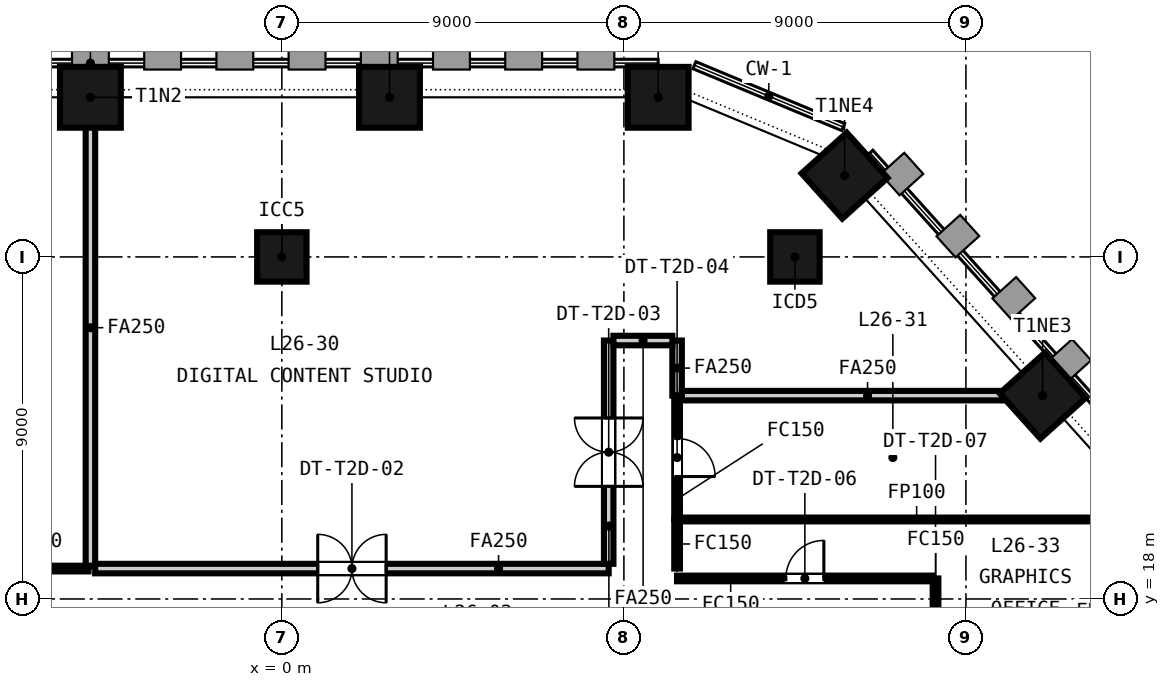
"""IFC4 building model, lengths in metres.
Left out: names, types, materials, properties, quantities, classifications, styles, units other than length and angle.
Written with IfcOpenShell. Run it as: python <this file> out.ifc"""

import sys

from ifc_helpers import new_model, si_unit, direction, frame, frame_2d, origin, origin_2d, place, context, subcontext, project, spatial, rectangle, extrude, element, fill, save


model = new_model("IFC4")
c1 = context("Model", 3, precision=1e-05, world=origin(), true_north=direction((0.0, 1.0)))
c2 = subcontext(c1, "Body", "Model", "MODEL_VIEW")
j1 = project(units=[si_unit("LENGTHUNIT", "METRE"), si_unit("PLANEANGLEUNIT", "RADIAN")], contexts=[c1])
p1 = place(None, origin())
s1 = spatial("IfcSite", under=j1, at=p1, CompositionType="ELEMENT")
p2 = place(p1, origin())
s2 = spatial("IfcBuilding", under=s1, at=p2, CompositionType="ELEMENT")
p3 = place(p2, frame((0.0, 0.0, 109.85)))
s3 = spatial("IfcBuildingStorey", under=s2, at=p3, CompositionType="ELEMENT", Elevation=109.85)
for number, where, z_axis, x_axis in (
    (1, (9.902, 31.2, -0.15), (0.0, 0.0, 1.0), (-1.0, 0.0, 0.0)),
    (2, (2.832, 31.2, -0.15), (0.0, 0.0, 1.0), (-1.0, 0.0, 0.0)),
    (3, (-5.037, 31.2, -0.15), (0.0, 0.0, 1.0), (-1.0, 0.0, 0.0)),
    (4, (20.018, 23.35, -0.15), (0.0, 0.0, 1.0), (-0.669, 0.743, 0.0)),
    (5, (14.806, 29.139, -0.15), (0.0, 0.0, 1.0), (-0.669, 0.743, 0.0)),
):
    element("IfcColumn", number, at=place(p3, frame(where, z_axis=z_axis, x_axis=x_axis)), inside=s3, PredefinedType="COLUMN", context=c2, shape_type="SweptSolid", body=[
        extrude(rectangle(XDim=1.6, YDim=1.6, at=origin_2d()), origin(), (0.0, 0.0, 1.0), 3.65),
    ])
for number, where, z_axis, x_axis in (
    (6, (0.0, 27.0, -0.15), (0.0, 0.0, 1.0), (1.0, 0.0, 0.0)),
    (7, (13.5, 27.0, -0.15), (0.0, 0.0, 1.0), (1.0, 0.0, 0.0)),
):
    element("IfcColumn", number, at=place(p3, frame(where, z_axis=z_axis, x_axis=x_axis)), inside=s3, PredefinedType="COLUMN", context=c2, shape_type="SweptSolid", body=[
        extrude(rectangle(XDim=1.3, YDim=1.3, at=origin_2d()), origin(), (0.0, 0.0, 1.0), 3.65),
    ])
p4 = place(p3, frame((10.4, 24.8, 0.0), z_axis=(0.0, 0.0, 1.0), x_axis=(0.0, -1.0, 0.0)))
e8 = element("IfcWall", 8, at=p4, inside=s3, PredefinedType="PARTITIONING", context=c2, shape_type="SweptSolid", body=[
    extrude(rectangle(XDim=1.45, YDim=0.25, at=frame_2d((0.725, 0.0))), origin(), (0.0, 0.0, 1.0), 2.741),
])
p5 = place(p3, frame((10.4, 23.35, 0.0), z_axis=(0.0, 0.0, 1.0), x_axis=(0.0, -1.0, 0.0)))
e9 = element("IfcWall", 9, at=p5, inside=s3, PredefinedType="PARTITIONING", context=c2, shape_type="SweptSolid", body=[
    extrude(rectangle(XDim=3.258, YDim=0.15, at=frame_2d((1.629, 0.0))), origin(), (0.0, 0.0, 1.0), 2.741),
])
p6 = place(p5, frame((1.129, 0.0, 0.0)))
e10 = element("IfcOpeningElement", 10, at=p6, cuts=e9, PredefinedType="OPENING", context=c2, shape_type="SweptSolid", body=[
    extrude(rectangle(XDim=1.0, YDim=2.1, at=frame_2d((0.5, 1.05))), frame((0.0, 0.085, 0.0), z_axis=(0.0, -1.0, 0.0), x_axis=(1.0, 0.0, 0.0)), (0.0, 0.0, 1.0), 0.17),
])
p7 = place(p3, frame((10.4, 20.092, 0.0), z_axis=(0.0, 0.0, 1.0), x_axis=(0.0, -1.0, 0.0)))
e11 = element("IfcWall", 11, at=p7, inside=s3, PredefinedType="PARTITIONING", context=c2, shape_type="SweptSolid", body=[
    extrude(rectangle(XDim=1.29, YDim=0.15, at=frame_2d((0.645, 0.0))), origin(), (0.0, 0.0, 1.0), 2.741),
])
p8 = place(p3, frame((17.2, 18.54, 0.0), z_axis=(0.0, 0.0, 1.0), x_axis=(0.0, -1.0, 0.0)))
e12 = element("IfcWall", 12, at=p8, inside=s3, PredefinedType="PARTITIONING", context=c2, shape_type="SweptSolid", body=[
    extrude(rectangle(XDim=1.573, YDim=0.15, at=frame_2d((0.787, 0.0))), origin(), (0.0, 0.0, 1.0), 2.741),
])
p9 = place(p3, frame((-8.025, 18.8, 0.0), z_axis=(0.0, 0.0, 1.0), x_axis=(1.0, 0.0, 0.0)))
e13 = element("IfcWall", 13, at=p9, inside=s3, PredefinedType="PARTITIONING", context=c2, shape_type="SweptSolid", body=[
    extrude(rectangle(XDim=2.938, YDim=0.15, at=frame_2d((1.469, 0.0))), origin(), (0.0, 0.0, 1.0), 2.741),
])
p10 = place(p3, frame((-5.037, 18.875, 0.0), z_axis=(0.0, 0.0, 1.0), x_axis=(0.0, 1.0, 0.0)))
e14 = element("IfcWall", 14, at=p10, inside=s3, PredefinedType="PARTITIONING", context=c2, shape_type="SweptSolid", body=[
    extrude(rectangle(XDim=12.525, YDim=0.25, at=frame_2d((6.262, 0.0))), origin(), (0.0, 0.0, 1.0), 2.741),
])
p11 = place(p3, frame((-4.912, 18.8, 0.0), z_axis=(0.0, 0.0, 1.0), x_axis=(1.0, 0.0, 0.0)))
e15 = element("IfcWall", 15, at=p11, inside=s3, PredefinedType="PARTITIONING", context=c2, shape_type="SweptSolid", body=[
    extrude(rectangle(XDim=13.512, YDim=0.25, at=frame_2d((6.756, 0.0))), origin(), (0.0, 0.0, 1.0), 2.741),
])
p12 = place(p11, frame((5.856, 0.0, 0.0)))
e16 = element("IfcOpeningElement", 16, at=p12, cuts=e15, PredefinedType="OPENING", context=c2, shape_type="SweptSolid", body=[
    extrude(rectangle(XDim=1.8, YDim=2.1, at=frame_2d((0.9, 1.05))), frame((0.0, 0.135, 0.0), z_axis=(0.0, -1.0, 0.0), x_axis=(1.0, 0.0, 0.0)), (0.0, 0.0, 1.0), 0.27),
])
p13 = place(p3, frame((8.6, 18.925, 0.0), z_axis=(0.0, 0.0, 1.0), x_axis=(0.0, 1.0, 0.0)))
e17 = element("IfcWall", 17, at=p13, inside=s3, PredefinedType="PARTITIONING", context=c2, shape_type="SweptSolid", body=[
    extrude(rectangle(XDim=5.875, YDim=0.25, at=frame_2d((2.938, 0.0))), origin(), (0.0, 0.0, 1.0), 2.741),
])
p14 = place(p13, frame((2.038, 0.0, 0.0)))
e18 = element("IfcOpeningElement", 18, at=p14, cuts=e17, PredefinedType="OPENING", context=c2, shape_type="SweptSolid", body=[
    extrude(rectangle(XDim=1.8, YDim=2.1, at=frame_2d((0.9, 1.05))), frame((0.0, 0.135, 0.0), z_axis=(0.0, -1.0, 0.0), x_axis=(1.0, 0.0, 0.0)), (0.0, 0.0, 1.0), 0.27),
])
p15 = place(p3, frame((8.725, 24.8, 0.0), z_axis=(0.0, 0.0, 1.0), x_axis=(1.0, 0.0, 0.0)))
e19 = element("IfcWall", 19, at=p15, inside=s3, PredefinedType="PARTITIONING", context=c2, shape_type="SweptSolid", body=[
    extrude(rectangle(XDim=1.55, YDim=0.25, at=frame_2d((0.775, 0.0))), origin(), (0.0, 0.0, 1.0), 2.741),
])
p16 = place(p3, frame((10.525, 23.35, 0.0), z_axis=(0.0, 0.0, 1.0), x_axis=(1.0, 0.0, 0.0)))
e20 = element("IfcWall", 20, at=p16, inside=s3, PredefinedType="PARTITIONING", context=c2, shape_type="SweptSolid", body=[
    extrude(rectangle(XDim=9.762, YDim=0.25, at=frame_2d((4.881, 0.0))), origin(), (0.0, 0.0, 1.0), 2.741),
])
p17 = place(p3, frame((10.475, 20.092, 0.0), z_axis=(0.0, 0.0, 1.0), x_axis=(1.0, 0.0, 0.0)))
e21 = element("IfcWall", 21, at=p17, inside=s3, PredefinedType="PARTITIONING", context=c2, shape_type="SweptSolid", body=[
    extrude(rectangle(XDim=12.446, YDim=0.1, at=frame_2d((6.223, 0.0))), origin(), (0.0, 0.0, 1.0), 2.741),
])
p18 = place(p3, frame((10.398, 18.54, 0.0), z_axis=(0.0, 0.0, 1.0), x_axis=(1.0, 0.0, 0.0)))
e22 = element("IfcWall", 22, at=p18, inside=s3, PredefinedType="PARTITIONING", context=c2, shape_type="SweptSolid", body=[
    extrude(rectangle(XDim=6.727, YDim=0.15, at=frame_2d((3.364, 0.0))), origin(), (0.0, 0.0, 1.0), 2.741),
])
p19 = place(p18, frame((2.864, 0.0, 0.0)))
e23 = element("IfcOpeningElement", 23, at=p19, cuts=e22, PredefinedType="OPENING", context=c2, shape_type="SweptSolid", body=[
    extrude(rectangle(XDim=1.0, YDim=2.1, at=frame_2d((0.5, 1.05))), frame((0.0, 0.085, 0.0), z_axis=(0.0, -1.0, 0.0), x_axis=(1.0, 0.0, 0.0)), (0.0, 0.0, 1.0), 0.17),
])
p20 = place(p12, origin())
e24 = element("IfcDoor", 24, at=p20, inside=s3, OperationType="DOUBLE_DOOR_DOUBLE_SWING", PredefinedType="DOOR", context=c2, shape_type="SweptSolid", body=[
    extrude(rectangle(XDim=1.8, YDim=2.1, at=frame_2d((0.9, 1.05))), frame((0.0, 0.025, 0.0), z_axis=(0.0, -1.0, 0.0), x_axis=(1.0, 0.0, 0.0)), (0.0, 0.0, 1.0), 0.05),
])
fill(e16, e24)
p21 = place(p14, origin())
e25 = element("IfcDoor", 25, at=p21, inside=s3, OperationType="DOUBLE_DOOR_DOUBLE_SWING", PredefinedType="DOOR", context=c2, shape_type="SweptSolid", body=[
    extrude(rectangle(XDim=1.8, YDim=2.1, at=frame_2d((0.9, 1.05))), frame((0.0, 0.025, 0.0), z_axis=(0.0, -1.0, 0.0), x_axis=(1.0, 0.0, 0.0)), (0.0, 0.0, 1.0), 0.05),
])
fill(e18, e25)
p22 = place(p6, origin())
e26 = element("IfcDoor", 26, at=p22, inside=s3, OperationType="SINGLE_SWING_RIGHT", PredefinedType="DOOR", context=c2, shape_type="SweptSolid", body=[
    extrude(rectangle(XDim=1.0, YDim=2.1, at=frame_2d((0.5, 1.05))), frame((0.0, 0.025, 0.0), z_axis=(0.0, -1.0, 0.0), x_axis=(1.0, 0.0, 0.0)), (0.0, 0.0, 1.0), 0.05),
])
fill(e10, e26)
p23 = place(p19, origin())
e27 = element("IfcDoor", 27, at=p23, inside=s3, OperationType="SINGLE_SWING_RIGHT", PredefinedType="DOOR", context=c2, shape_type="SweptSolid", body=[
    extrude(rectangle(XDim=1.0, YDim=2.1, at=frame_2d((0.5, 1.05))), frame((0.0, 0.025, 0.0), z_axis=(0.0, -1.0, 0.0), x_axis=(1.0, 0.0, 0.0)), (0.0, 0.0, 1.0), 0.05),
])
fill(e23, e27)
save(model, sys.argv[1])
